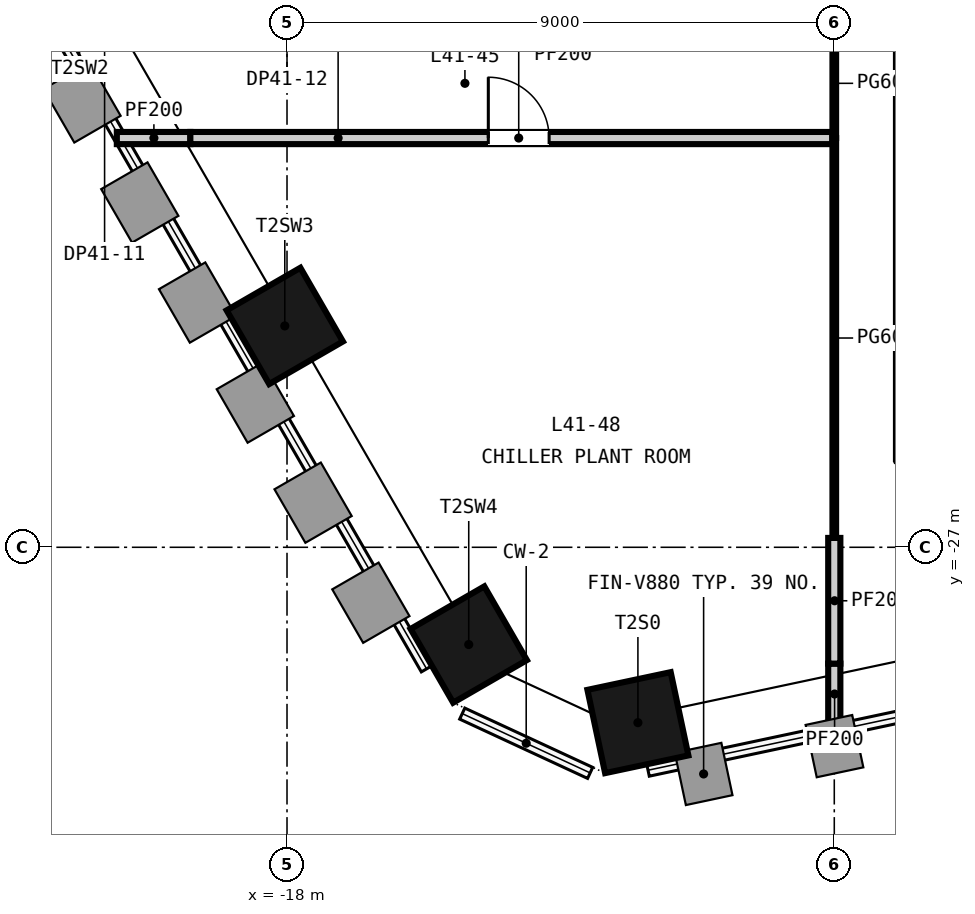
"""IFC4 building model, lengths in metres.
Left out: names, types, materials, properties, quantities, classifications, styles, units other than length and angle.
Written with IfcOpenShell. Run it as: python <this file> out.ifc"""

import sys

from ifc_helpers import new_model, si_unit, direction, frame, frame_2d, origin, origin_2d, place, context, subcontext, project, spatial, rectangle, extrude, element, fill, save


model = new_model("IFC4")
c1 = context("Model", 3, precision=1e-05, world=origin(), true_north=direction((0.0, 1.0)))
c2 = subcontext(c1, "Body", "Model", "MODEL_VIEW")
j1 = project(units=[si_unit("LENGTHUNIT", "METRE"), si_unit("PLANEANGLEUNIT", "RADIAN")], contexts=[c1])
p1 = place(None, origin())
s1 = spatial("IfcSite", under=j1, at=p1, CompositionType="ELEMENT")
p2 = place(p1, origin())
s2 = spatial("IfcBuilding", under=s1, at=p2, CompositionType="ELEMENT")
p3 = place(p2, frame((0.0, 0.0, 166.3)))
s3 = spatial("IfcBuildingStorey", under=s2, at=p3, CompositionType="ELEMENT", Elevation=166.3)
for number, where, z_axis, x_axis in (
    (1, (-18.037, -23.36, -0.3), (0.0, 0.0, 1.0), (0.5, -0.866, 0.0)),
    (2, (-15.011, -28.599, -0.3), (0.0, 0.0, 1.0), (0.5, -0.866, 0.0)),
    (3, (-12.229, -29.884, -0.3), (0.0, 0.0, 1.0), (0.978, 0.208, 0.0)),
):
    element("IfcColumn", number, at=place(p3, frame(where, z_axis=z_axis, x_axis=x_axis)), inside=s3, PredefinedType="COLUMN", context=c2, shape_type="SweptSolid", body=[
        extrude(rectangle(XDim=1.4, YDim=1.4, at=origin_2d()), origin(), (0.0, 0.0, 1.0), 4.65),
    ])
p4 = place(p3, frame((-20.799, -20.27, 0.0), z_axis=(0.0, 0.0, 1.0), x_axis=(1.0, 0.0, 0.0)))
e4 = element("IfcWall", 4, at=p4, inside=s3, PredefinedType="PARTITIONING", context=c2, shape_type="SweptSolid", body=[
    extrude(rectangle(XDim=1.209, YDim=0.2, at=frame_2d((0.604, 0.0))), origin(), (0.0, 0.0, 1.0), 3.6),
])
p5 = place(p3, frame((-19.59, -20.27, 0.0), z_axis=(0.0, 0.0, 1.0), x_axis=(1.0, 0.0, 0.0)))
e5 = element("IfcWall", 5, at=p5, inside=s3, PredefinedType="PARTITIONING", context=c2, shape_type="SweptSolid", body=[
    extrude(rectangle(XDim=10.56, YDim=0.2, at=frame_2d((5.28, 0.0))), origin(), (0.0, 0.0, 1.0), 4.35),
])
p6 = place(p5, frame((4.9, 0.0, 0.0)))
e6 = element("IfcOpeningElement", 6, at=p6, cuts=e5, PredefinedType="OPENING", context=c2, shape_type="SweptSolid", body=[
    extrude(rectangle(XDim=1.0, YDim=2.1, at=frame_2d((0.5, 1.05))), frame((0.0, 0.11, 0.0), z_axis=(0.0, -1.0, 0.0), x_axis=(1.0, 0.0, 0.0)), (0.0, 0.0, 1.0), 0.22),
])
p7 = place(p3, frame((-9.0, -29.913, 0.0), z_axis=(0.0, 0.0, 1.0), x_axis=(0.0, 1.0, 0.0)))
e7 = element("IfcWall", 7, at=p7, inside=s3, PredefinedType="PARTITIONING", context=c2, shape_type="SweptSolid", body=[
    extrude(rectangle(XDim=1.0, YDim=0.2, at=frame_2d((0.5, 0.0))), origin(), (0.0, 0.0, 1.0), 3.6),
])
p8 = place(p3, frame((-9.0, -28.913, 0.0), z_axis=(0.0, 0.0, 1.0), x_axis=(0.0, 1.0, 0.0)))
e8 = element("IfcWall", 8, at=p8, inside=s3, PredefinedType="PARTITIONING", context=c2, shape_type="SweptSolid", body=[
    extrude(rectangle(XDim=2.067, YDim=0.2, at=frame_2d((1.034, 0.0))), origin(), (0.0, 0.0, 1.0), 4.35),
])
p9 = place(p3, frame((-9.0, -26.846, 0.0), z_axis=(0.0, 0.0, 1.0), x_axis=(0.0, 1.0, 0.0)))
e9 = element("IfcWall", 9, at=p9, inside=s3, PredefinedType="PARTITIONING", context=c2, shape_type="SweptSolid", body=[
    extrude(rectangle(XDim=6.575, YDim=0.06, at=frame_2d((3.287, 0.0))), origin(), (0.0, 0.0, 1.0), 4.35),
])
p10 = place(p3, frame((-9.0, -20.269, 0.0), z_axis=(0.0, 0.0, 1.0), x_axis=(0.0, 1.0, 0.0)))
e10 = element("IfcWall", 10, at=p10, inside=s3, PredefinedType="PARTITIONING", context=c2, shape_type="SweptSolid", body=[
    extrude(rectangle(XDim=1.798, YDim=0.06, at=frame_2d((0.899, 0.0))), origin(), (0.0, 0.0, 1.0), 4.35),
])
p11 = place(p6, origin())
e11 = element("IfcDoor", 11, at=p11, inside=s3, OperationType="SINGLE_SWING_LEFT", PredefinedType="DOOR", context=c2, shape_type="SweptSolid", body=[
    extrude(rectangle(XDim=1.0, YDim=2.1, at=frame_2d((0.5, 1.05))), frame((0.0, 0.025, 0.0), z_axis=(0.0, -1.0, 0.0), x_axis=(1.0, 0.0, 0.0)), (0.0, 0.0, 1.0), 0.05),
])
fill(e6, e11)
save(model, sys.argv[1])
